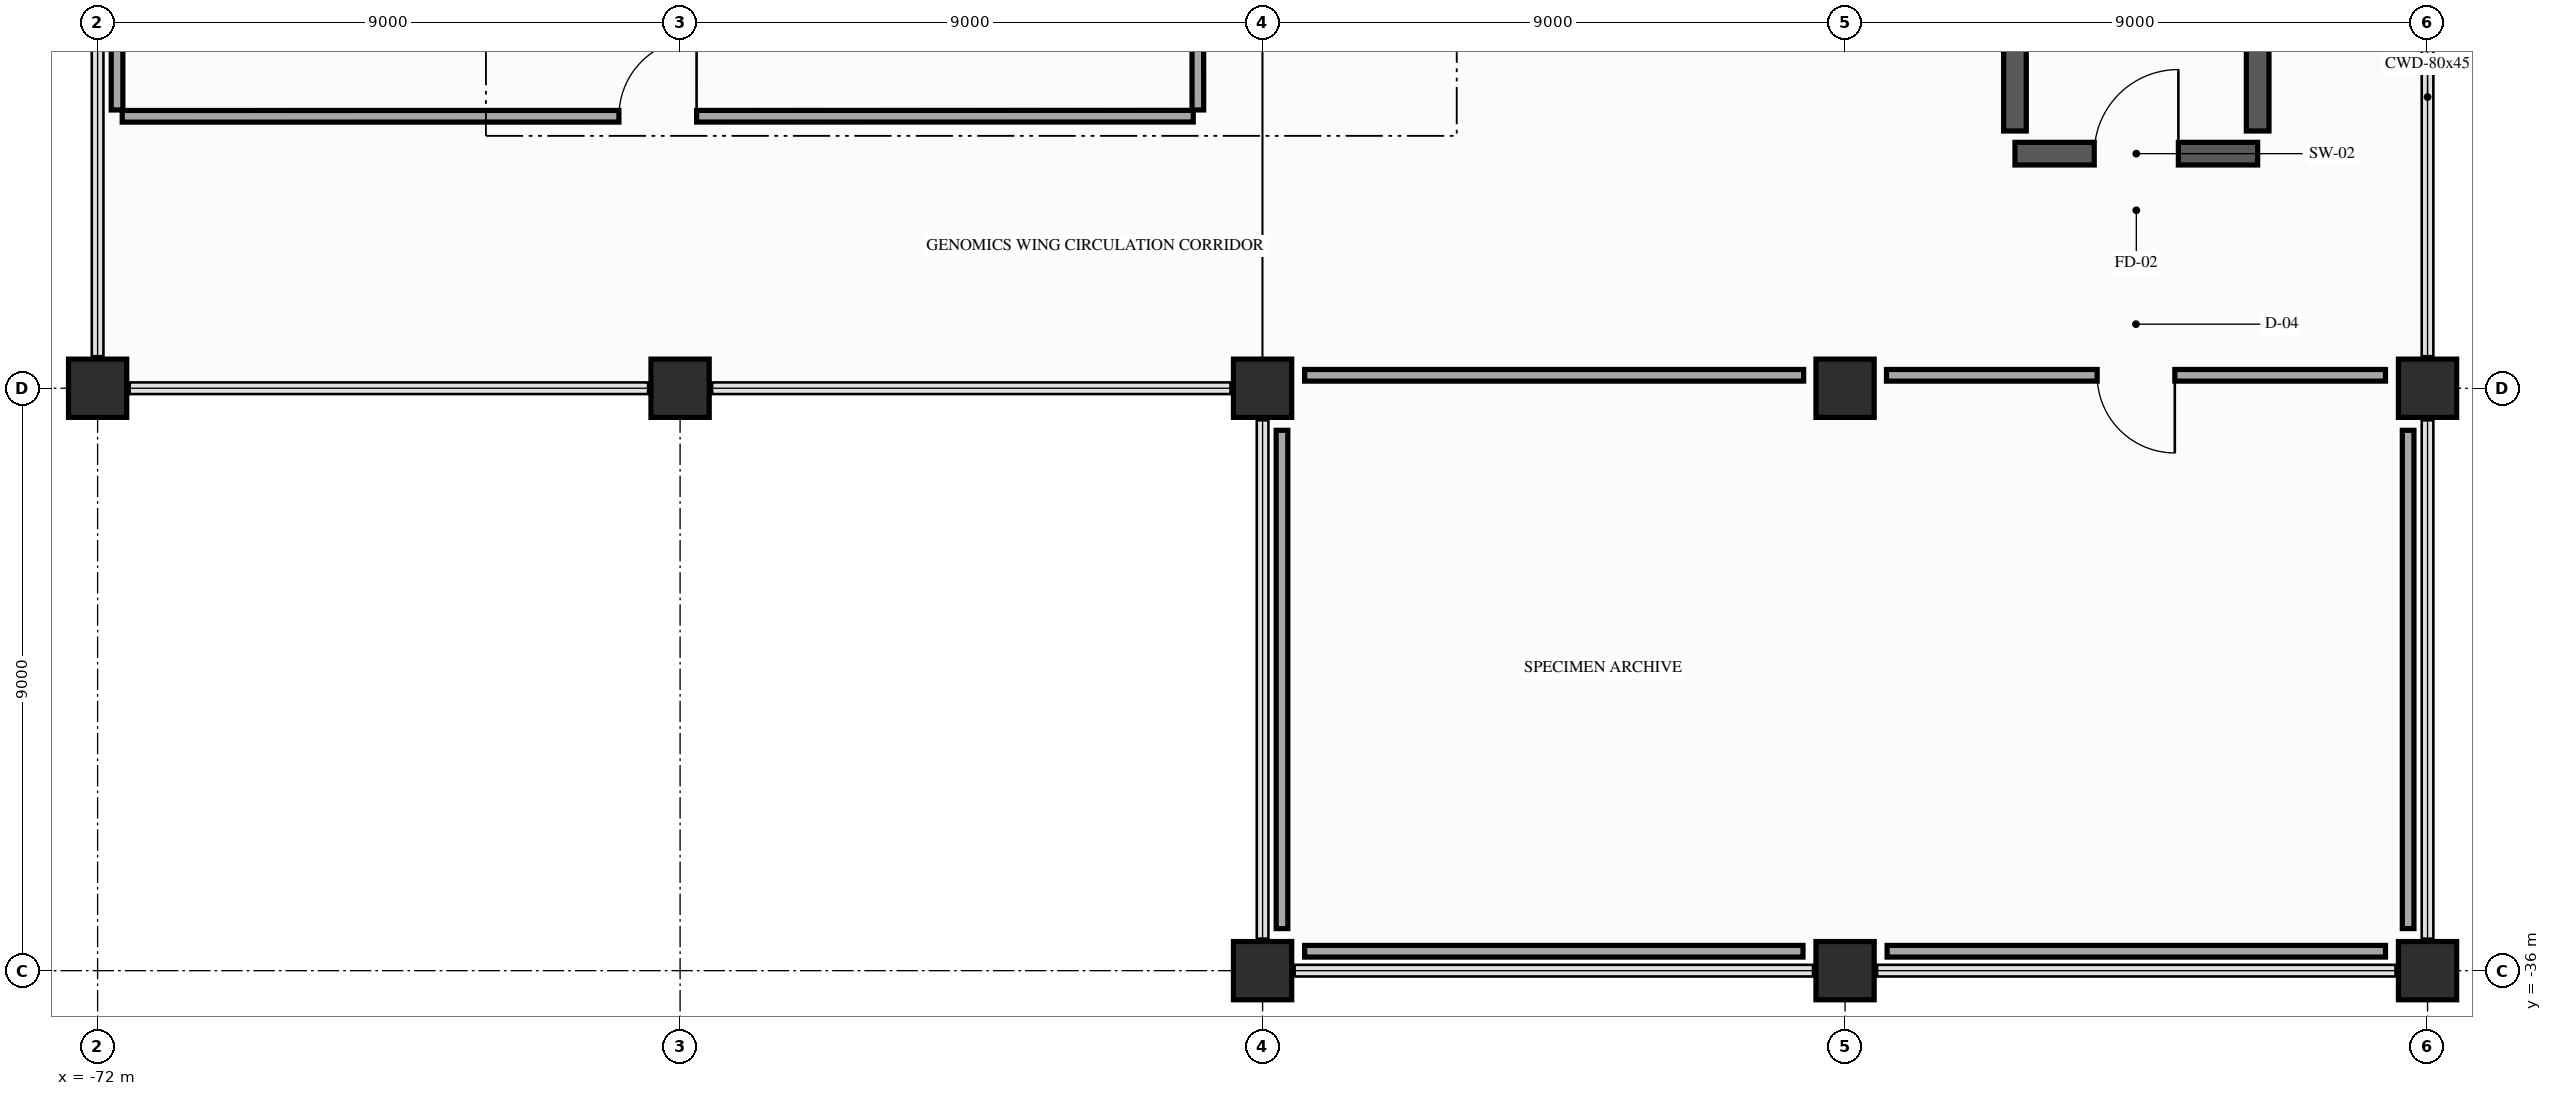
"""IFC4 building model, lengths in metres.
Left out: names, types, materials, properties, quantities, classifications, styles, units other than length and angle.
Written with IfcOpenShell. Run it as: python <this file> out.ifc"""

import sys

from ifc_helpers import new_model, si_unit, direction, frame, frame_2d, origin, origin_2d, place, context, subcontext, project, spatial, rectangle, extrude, element, fill, save


model = new_model("IFC4")
c1 = context("Model", 3, precision=1e-05, world=origin(), true_north=direction((0.0, 1.0)))
c2 = subcontext(c1, "Body", "Model", "MODEL_VIEW")
j1 = project(units=[si_unit("LENGTHUNIT", "METRE"), si_unit("PLANEANGLEUNIT", "RADIAN")], contexts=[c1])
p1 = place(None, origin())
s1 = spatial("IfcSite", under=j1, at=p1, CompositionType="ELEMENT")
p2 = place(p1, origin())
s2 = spatial("IfcBuilding", under=s1, at=p2, CompositionType="ELEMENT")
p3 = place(p2, frame((0.0, 0.0, 10.8)))
s3 = spatial("IfcBuildingStorey", under=s2, at=p3, CompositionType="ELEMENT", Elevation=10.8)
for number, where, z_axis, x_axis in (
    (1, (-72.0, -27.0, 0.0), (0.0, 0.0, 1.0), (1.0, 0.0, 0.0)),
    (2, (-63.0, -27.0, 0.0), (0.0, 0.0, 1.0), (1.0, 0.0, 0.0)),
    (3, (-54.0, -36.0, 0.0), (0.0, 0.0, 1.0), (1.0, 0.0, 0.0)),
    (4, (-54.0, -27.0, 0.0), (0.0, 0.0, 1.0), (1.0, 0.0, 0.0)),
    (5, (-45.0, -36.0, 0.0), (0.0, 0.0, 1.0), (1.0, 0.0, 0.0)),
    (6, (-45.0, -27.0, 0.0), (0.0, 0.0, 1.0), (1.0, 0.0, 0.0)),
    (7, (-36.0, -36.0, 0.0), (0.0, 0.0, 1.0), (1.0, 0.0, 0.0)),
    (8, (-36.0, -27.0, 0.0), (0.0, 0.0, 1.0), (1.0, 0.0, 0.0)),
):
    element("IfcColumn", number, at=place(p3, frame(where, z_axis=z_axis, x_axis=x_axis)), inside=s3, PredefinedType="COLUMN", context=c2, shape_type="SweptSolid", body=[
        extrude(rectangle(XDim=0.9, YDim=0.9, at=origin_2d()), origin(), (0.0, 0.0, 1.0), 5.4),
    ])
p4 = place(p3, frame((-42.375, -23.375, 0.0), z_axis=(0.0, 0.0, 1.0), x_axis=(1.0, 0.0, 0.0)))
e9 = element("IfcWall", 9, at=p4, inside=s3, PredefinedType="SHEAR", context=c2, shape_type="SweptSolid", body=[
    extrude(rectangle(XDim=3.75, YDim=0.35, at=frame_2d((1.875, 0.0))), origin(), (0.0, 0.0, 1.0), 5.16),
])
p5 = place(p4, frame((1.225, 0.0, 0.0)))
e10 = element("IfcOpeningElement", 10, at=p5, cuts=e9, PredefinedType="OPENING", context=c2, shape_type="SweptSolid", body=[
    extrude(rectangle(XDim=1.3, YDim=2.2, at=frame_2d((0.65, 1.1))), frame((0.0, 0.185, 0.0), z_axis=(0.0, -1.0, 0.0), x_axis=(1.0, 0.0, 0.0)), (0.0, 0.0, 1.0), 0.37),
])
for number, where, z_axis, x_axis in (
    (11, (-42.375, -23.025, 0.0), (0.0, 0.0, 1.0), (0.0, 1.0, 0.0)),
    (12, (-38.625, -23.025, 0.0), (0.0, 0.0, 1.0), (0.0, 1.0, 0.0)),
):
    element("IfcWall", number, at=place(p3, frame(where, z_axis=z_axis, x_axis=x_axis)), inside=s3, PredefinedType="SHEAR", context=c2, shape_type="SweptSolid", body=[
        extrude(rectangle(XDim=9.1, YDim=0.35, at=frame_2d((4.55, 0.0))), origin(), (0.0, 0.0, 1.0), 5.16),
    ])
p6 = place(p3, frame((-71.7, -18.65, 0.0), z_axis=(0.0, 0.0, 1.0), x_axis=(0.0, -1.0, 0.0)))
e13 = element("IfcWall", 13, at=p6, inside=s3, PredefinedType="PARTITIONING", context=c2, shape_type="SweptSolid", body=[
    extrude(rectangle(XDim=4.05, YDim=0.18, at=frame_2d((2.025, 0.0))), origin(), (0.0, 0.0, 1.0), 4.545),
])
p7 = place(p3, frame((-71.62, -22.798, 0.0), z_axis=(0.0, 0.0, 1.0), x_axis=(0.999999991186, 0.000132772736, 0.0)))
e14 = element("IfcWall", 14, at=p7, inside=s3, PredefinedType="PARTITIONING", context=c2, shape_type="SweptSolid", body=[
    extrude(rectangle(XDim=16.549, YDim=0.18, at=frame_2d((8.274, 0.0))), origin(), (0.0, 0.0, 1.0), 4.545),
])
p8 = place(p7, frame((7.675, 0.0, 0.0)))
e15 = element("IfcOpeningElement", 15, at=p8, cuts=e14, PredefinedType="OPENING", context=c2, shape_type="SweptSolid", body=[
    extrude(rectangle(XDim=1.2, YDim=2.2, at=frame_2d((0.6, 1.1))), frame((0.0, 0.1, 0.0), z_axis=(0.0, -1.0, 0.0), x_axis=(1.0, 0.0, 0.0)), (0.0, 0.0, 1.0), 0.2),
])
p9 = place(p3, frame((-55.0, -22.7, 0.0), z_axis=(0.0, 0.0, 1.0), x_axis=(-0.000293067118, 0.999999957056, 0.0)))
e16 = element("IfcWall", 16, at=p9, inside=s3, PredefinedType="PARTITIONING", context=c2, shape_type="SweptSolid", body=[
    extrude(rectangle(XDim=13.329, YDim=0.18, at=frame_2d((6.665, 0.0))), origin(), (0.0, 0.0, 1.0), 4.545),
])
for number, where, z_axis, x_axis in (
    (17, (-53.35, -35.7, 0.0), (0.0, 0.0, 1.0), (1.0, 0.0, 0.0)),
    (18, (-44.35, -35.7, 0.0), (0.0, 0.0, 1.0), (1.0, 0.0, 0.0)),
    (19, (-36.3, -35.35, 0.0), (0.0, 0.0, 1.0), (0.0, 1.0, 0.0)),
):
    element("IfcWall", number, at=place(p3, frame(where, z_axis=z_axis, x_axis=x_axis)), inside=s3, PredefinedType="PARTITIONING", context=c2, shape_type="SweptSolid", body=[
        extrude(rectangle(XDim=7.7, YDim=0.18, at=frame_2d((3.85, 0.0))), origin(), (0.0, 0.0, 1.0), 4.545),
    ])
p10 = place(p3, frame((-36.65, -26.8, 0.0), z_axis=(0.0, 0.0, 1.0), x_axis=(-1.0, 0.0, 0.0)))
e20 = element("IfcWall", 20, at=p10, inside=s3, PredefinedType="PARTITIONING", context=c2, shape_type="SweptSolid", body=[
    extrude(rectangle(XDim=7.71, YDim=0.18, at=frame_2d((3.855, 0.0))), origin(), (0.0, 0.0, 1.0), 4.545),
])
p11 = place(p10, frame((3.255, 0.0, 0.0)))
e21 = element("IfcOpeningElement", 21, at=p11, cuts=e20, PredefinedType="OPENING", context=c2, shape_type="SweptSolid", body=[
    extrude(rectangle(XDim=1.2, YDim=2.2, at=frame_2d((0.6, 1.1))), frame((0.0, 0.1, 0.0), z_axis=(0.0, -1.0, 0.0), x_axis=(1.0, 0.0, 0.0)), (0.0, 0.0, 1.0), 0.2),
])
p12 = place(p3, frame((-45.64, -26.8, 0.0), z_axis=(0.0, 0.0, 1.0), x_axis=(-1.0, 0.0, 0.0)))
e22 = element("IfcWall", 22, at=p12, inside=s3, PredefinedType="PARTITIONING", context=c2, shape_type="SweptSolid", body=[
    extrude(rectangle(XDim=7.71, YDim=0.18, at=frame_2d((3.855, 0.0))), origin(), (0.0, 0.0, 1.0), 4.545),
])
p13 = place(p3, frame((-53.7, -27.65, 0.0), z_axis=(0.0, 0.0, 1.0), x_axis=(0.0, -1.0, 0.0)))
e23 = element("IfcWall", 23, at=p13, inside=s3, PredefinedType="PARTITIONING", context=c2, shape_type="SweptSolid", body=[
    extrude(rectangle(XDim=7.7, YDim=0.18, at=frame_2d((3.85, 0.0))), origin(), (0.0, 0.0, 1.0), 4.545),
])
p14 = place(p5, origin())
e24 = element("IfcDoor", 24, at=p14, inside=s3, OperationType="SINGLE_SWING_RIGHT", PredefinedType="DOOR", context=c2, shape_type="SweptSolid", body=[
    extrude(rectangle(XDim=1.3, YDim=2.2, at=frame_2d((0.65, 1.1))), frame((0.0, 0.025, 0.0), z_axis=(0.0, -1.0, 0.0), x_axis=(1.0, 0.0, 0.0)), (0.0, 0.0, 1.0), 0.05),
])
fill(e10, e24)
p15 = place(p8, origin())
e25 = element("IfcDoor", 25, at=p15, inside=s3, OperationType="SINGLE_SWING_RIGHT", PredefinedType="DOOR", context=c2, shape_type="SweptSolid", body=[
    extrude(rectangle(XDim=1.2, YDim=2.2, at=frame_2d((0.6, 1.1))), frame((0.0, 0.025, 0.0), z_axis=(0.0, -1.0, 0.0), x_axis=(1.0, 0.0, 0.0)), (0.0, 0.0, 1.0), 0.05),
])
fill(e15, e25)
p16 = place(p11, origin())
e26 = element("IfcDoor", 26, at=p16, inside=s3, OperationType="SINGLE_SWING_LEFT", PredefinedType="DOOR", context=c2, shape_type="SweptSolid", body=[
    extrude(rectangle(XDim=1.2, YDim=2.2, at=frame_2d((0.6, 1.1))), frame((0.0, 0.025, 0.0), z_axis=(0.0, -1.0, 0.0), x_axis=(1.0, 0.0, 0.0)), (0.0, 0.0, 1.0), 0.05),
])
fill(e21, e26)
save(model, sys.argv[1])
